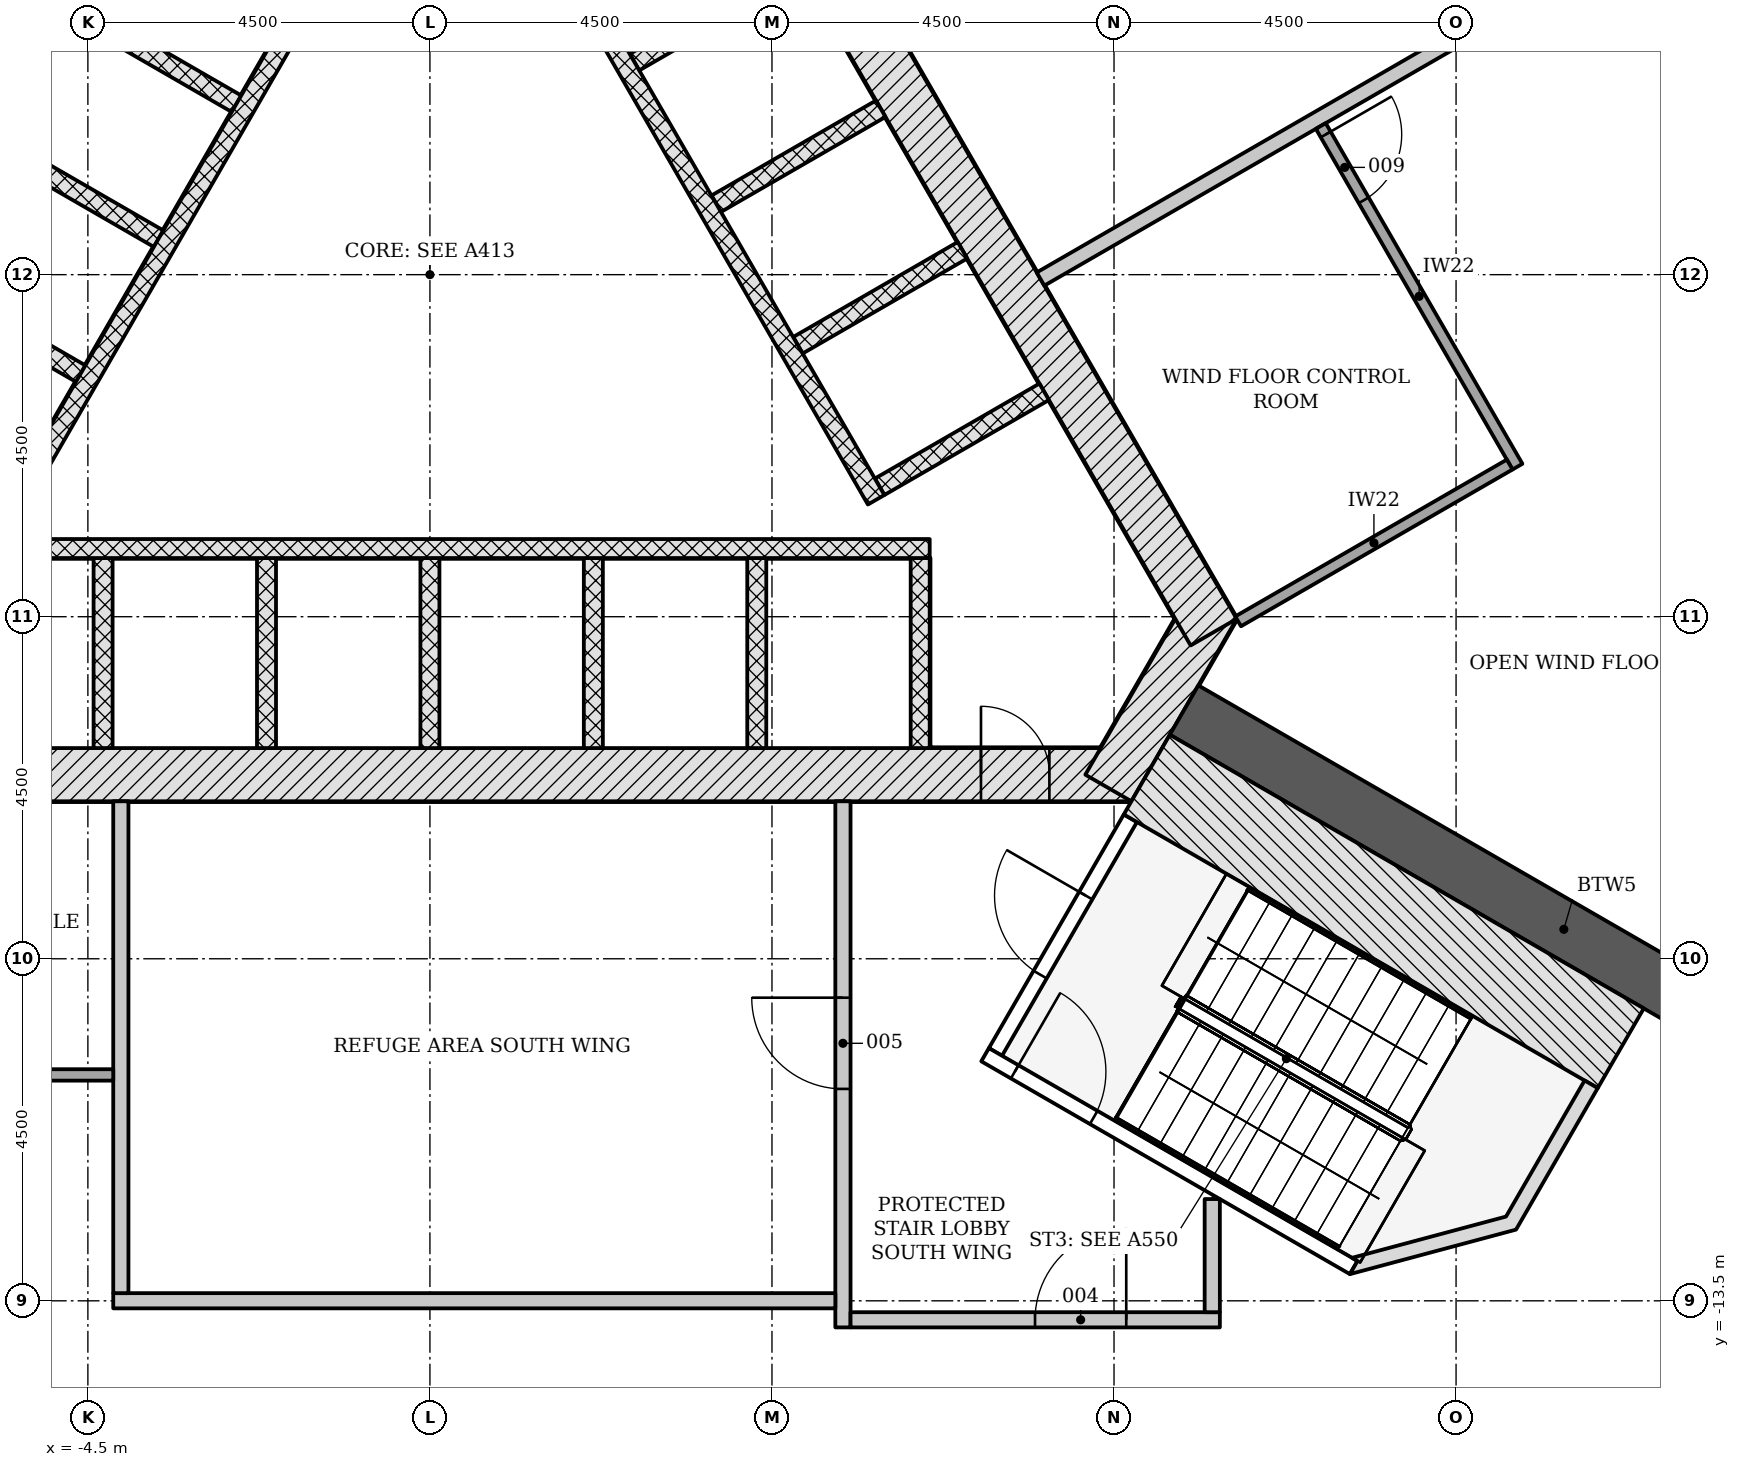
"""IFC4 building model, lengths in metres.
Left out: names, types, materials, properties, quantities, classifications, styles, units other than length and angle.
Written with IfcOpenShell. Run it as: python <this file> out.ifc"""

import sys

from ifc_helpers import new_model, si_unit, direction, frame, frame_2d, origin, place, context, subcontext, project, spatial, polyline, rectangle, outline, extrude, element, fill, save


model = new_model("IFC4")
c1 = context("Model", 3, precision=1e-05, world=origin(), true_north=direction((0.0, 1.0)))
c2 = subcontext(c1, "Body", "Model", "MODEL_VIEW")
j1 = project(units=[si_unit("LENGTHUNIT", "METRE"), si_unit("PLANEANGLEUNIT", "RADIAN")], contexts=[c1])
p1 = place(None, origin())
s1 = spatial("IfcSite", under=j1, at=p1, CompositionType="ELEMENT")
p2 = place(p1, origin())
s2 = spatial("IfcBuilding", under=s1, at=p2, CompositionType="ELEMENT")
p3 = place(p2, frame((0.0, 0.0, 127.5)))
s3 = spatial("IfcBuildingStorey", under=s2, at=p3, CompositionType="ELEMENT", Elevation=127.5)
p4 = place(p3, frame((-9.229, -6.578, -0.3), z_axis=(0.0, 0.0, 1.0), x_axis=(1.0, 0.0, 0.0)))
e1 = element("IfcWall", 1, at=p4, inside=s3, PredefinedType="SHEAR", context=c2, shape_type="SweptSolid", body=[
    extrude(rectangle(XDim=18.458, YDim=0.7, at=frame_2d((9.229, 0.0))), origin(), (0.0, 0.0, 1.0), 7.2),
])
p5 = place(p4, frame((1.0, 0.0, 0.3)))
e2 = element("IfcOpeningElement", 2, at=p5, cuts=e1, PredefinedType="OPENING", context=c2, shape_type="SweptSolid", body=[
    extrude(rectangle(XDim=1.0, YDim=2.1, at=frame_2d((0.5, 1.05))), frame((0.0, 0.36, 0.0), z_axis=(0.0, -1.0, 0.0), x_axis=(1.0, 0.0, 0.0)), (0.0, 0.0, 1.0), 0.72),
])
p6 = place(p4, frame((16.479, 0.0, 0.3)))
e3 = element("IfcOpeningElement", 3, at=p6, cuts=e1, PredefinedType="OPENING", context=c2, shape_type="SweptSolid", body=[
    extrude(rectangle(XDim=0.9, YDim=2.1, at=frame_2d((0.45, 1.05))), frame((0.0, 0.36, 0.0), z_axis=(0.0, -1.0, 0.0), x_axis=(1.0, 0.0, 0.0)), (0.0, 0.0, 1.0), 0.72),
])
p7 = place(p3, frame((8.926, -6.753, -0.3), z_axis=(0.0, 0.0, 1.0), x_axis=(0.500042739161, 0.866000726912, 0.0)))
e4 = element("IfcWall", 4, at=p7, inside=s3, PredefinedType="SHEAR", context=c2, shape_type="SweptSolid", body=[
    extrude(rectangle(XDim=2.771, YDim=0.7, at=frame_2d((1.386, 0.0))), origin(), (0.0, 0.0, 1.0), 7.2),
])
p8 = place(p3, frame((10.311, -4.703, -0.3), z_axis=(0.0, 0.0, 1.0), x_axis=(-0.500001446645, 0.866024568562, 0.0)))
e5 = element("IfcWall", 5, at=p8, inside=s3, PredefinedType="SHEAR", context=c2, shape_type="SweptSolid", body=[
    extrude(rectangle(XDim=18.458, YDim=0.7, at=frame_2d((9.229, 0.0))), origin(), (0.0, 0.0, 1.0), 7.2),
])
p9 = place(p3, frame((-1.083, 11.281, -0.3), z_axis=(0.0, 0.0, 1.0), x_axis=(-0.500001446645, -0.866024568562, 0.0)))
e6 = element("IfcWall", 6, at=p9, inside=s3, PredefinedType="SHEAR", context=c2, shape_type="SweptSolid", body=[
    extrude(rectangle(XDim=18.458, YDim=0.7, at=frame_2d((9.229, 0.0))), origin(), (0.0, 0.0, 1.0), 7.2),
])
p10 = place(p9, frame((8.979, 0.0, 0.3)))
e7 = element("IfcOpeningElement", 7, at=p10, cuts=e6, PredefinedType="OPENING", context=c2, shape_type="SweptSolid", body=[
    extrude(rectangle(XDim=1.2, YDim=2.1, at=frame_2d((0.6, 1.05))), frame((0.0, 0.36, 0.0), z_axis=(0.0, -1.0, 0.0), x_axis=(1.0, 0.0, 0.0)), (0.0, 0.0, 1.0), 0.72),
])
p11 = place(p9, frame((11.029, 0.0, 0.3)))
e8 = element("IfcOpeningElement", 8, at=p11, cuts=e6, PredefinedType="OPENING", context=c2, shape_type="SweptSolid", body=[
    extrude(rectangle(XDim=1.2, YDim=2.1, at=frame_2d((0.6, 1.05))), frame((0.0, 0.36, 0.0), z_axis=(0.0, -1.0, 0.0), x_axis=(1.0, 0.0, 0.0)), (0.0, 0.0, 1.0), 0.72),
])
p12 = place(p3, frame((9.922, -5.728, -0.3), z_axis=(0.0, 0.0, 1.0), x_axis=(0.866024913782, -0.500000848707, 0.0)))
e9 = element("IfcWall", 9, at=p12, inside=s3, PredefinedType="SHEAR", context=c2, shape_type="SweptSolid", body=[
    extrude(rectangle(XDim=11.539, YDim=0.75, at=frame_2d((5.769, 0.0))), origin(), (0.0, 0.0, 1.0), 7.2),
])
for number, where, z_axis, x_axis in (
    (10, (-4.3, -6.228, -0.3), (0.0, 0.0, 1.0), (0.0, 1.0, 0.0)),
    (11, (-2.15, -6.228, -0.3), (0.0, 0.0, 1.0), (0.0, 1.0, 0.0)),
    (12, (0.0, -6.228, -0.3), (0.0, 0.0, 1.0), (0.0, 1.0, 0.0)),
    (13, (2.15, -6.228, -0.3), (0.0, 0.0, 1.0), (0.0, 1.0, 0.0)),
    (14, (4.3, -6.228, -0.3), (0.0, 0.0, 1.0), (0.0, 1.0, 0.0)),
    (15, (6.45, -6.228, -0.3), (0.0, 0.0, 1.0), (0.0, 1.0, 0.0)),
):
    element("IfcWall", number, at=place(p3, frame(where, z_axis=z_axis, x_axis=x_axis)), inside=s3, PredefinedType="PARTITIONING", context=c2, shape_type="SweptSolid", body=[
        extrude(rectangle(XDim=2.5, YDim=0.25, at=frame_2d((1.25, 0.0))), origin(), (0.0, 0.0, 1.0), 7.2),
    ])
p13 = place(p3, frame((-6.575, -3.603, 0.0), z_axis=(0.0, 0.0, 1.0), x_axis=(1.0, 0.0, 0.0)))
e16 = element("IfcWall", 16, at=p13, inside=s3, PredefinedType="PARTITIONING", context=c2, shape_type="SweptSolid", body=[
    extrude(rectangle(XDim=13.15, YDim=0.25, at=frame_2d((6.575, 0.0))), origin(), (0.0, 0.0, 1.0), 6.9),
])
for number, where, z_axis, x_axis in (
    (17, (8.081, -1.541, 0.0), (0.0, 0.0, 1.0), (-0.866, -0.5, 0.0)),
    (18, (7.006, 0.321, 0.0), (0.0, 0.0, 1.0), (-0.866, -0.5, 0.0)),
):
    element("IfcWall", number, at=place(p3, frame(where, z_axis=z_axis, x_axis=x_axis)), inside=s3, PredefinedType="PARTITIONING", context=c2, shape_type="SweptSolid", body=[
        extrude(rectangle(XDim=2.5, YDim=0.25, at=frame_2d((1.25, 0.0))), origin(), (0.0, 0.0, 1.0), 6.9),
    ])
p14 = place(p3, frame((5.931, 2.183, 0.0), z_axis=(0.0, 0.0, 1.0), x_axis=(-0.866047370643, -0.499961950354, 0.0)))
e19 = element("IfcWall", 19, at=p14, inside=s3, PredefinedType="PARTITIONING", context=c2, shape_type="SweptSolid", body=[
    extrude(rectangle(XDim=2.5, YDim=0.25, at=frame_2d((1.25, 0.0))), origin(), (0.0, 0.0, 1.0), 6.9),
])
p15 = place(p3, frame((4.856, 4.045, 0.0), z_axis=(0.0, 0.0, 1.0), x_axis=(-0.866022959057, -0.500004234368, 0.0)))
e20 = element("IfcWall", 20, at=p15, inside=s3, PredefinedType="PARTITIONING", context=c2, shape_type="SweptSolid", body=[
    extrude(rectangle(XDim=2.5, YDim=0.25, at=frame_2d((1.25, 0.0))), origin(), (0.0, 0.0, 1.0), 6.9),
])
p16 = place(p3, frame((5.87, -2.961, 0.0), z_axis=(0.0, 0.0, 1.0), x_axis=(-0.50000615651, 0.866021849293, 0.0)))
e21 = element("IfcWall", 21, at=p16, inside=s3, PredefinedType="PARTITIONING", context=c2, shape_type="SweptSolid", body=[
    extrude(rectangle(XDim=11.0, YDim=0.25, at=frame_2d((5.5, 0.0))), origin(), (0.0, 0.0, 1.0), 6.9),
])
for number, where, z_axis, x_axis in (
    (22, (-5.056, 3.699, -0.3), (0.0, 0.0, 1.0), (0.866, -0.5, 0.0)),
    (23, (-6.081, 1.923, -0.3), (0.0, 0.0, 1.0), (0.866, -0.5, 0.0)),
    (24, (-7.106, 0.148, -0.3), (0.0, 0.0, 1.0), (0.866, -0.5, 0.0)),
):
    element("IfcWall", number, at=place(p3, frame(where, z_axis=z_axis, x_axis=x_axis)), inside=s3, PredefinedType="PARTITIONING", context=c2, shape_type="SweptSolid", body=[
        extrude(rectangle(XDim=2.9, YDim=0.25, at=frame_2d((1.45, 0.0))), origin(), (0.0, 0.0, 1.0), 7.2),
    ])
p17 = place(p3, frame((0.176, 6.711, 0.0), z_axis=(0.0, 0.0, 1.0), x_axis=(-0.500004227369, -0.866022963098, 0.0)))
e25 = element("IfcWall", 25, at=p17, inside=s3, PredefinedType="PARTITIONING", context=c2, shape_type="SweptSolid", body=[
    extrude(rectangle(XDim=11.8, YDim=0.25, at=frame_2d((5.9, 0.0))), origin(), (0.0, 0.0, 1.0), 6.9),
])
p18 = place(p3, frame((7.44, -10.226, -0.3), z_axis=(0.0, 0.0, 1.0), x_axis=(0.500022077904, 0.866012656725, 0.0)))
e26 = element("IfcWall", 26, at=p18, inside=s3, PredefinedType="SHEAR", context=c2, shape_type="SweptSolid", body=[
    extrude(rectangle(XDim=3.55, YDim=0.2, at=frame_2d((1.775, 0.0))), origin(), (0.0, 0.0, 1.0), 7.2),
])
p19 = place(p18, frame((1.175, 0.0, 0.3)))
e27 = element("IfcOpeningElement", 27, at=p19, cuts=e26, PredefinedType="OPENING", context=c2, shape_type="SweptSolid", body=[
    extrude(rectangle(XDim=1.2, YDim=2.1, at=frame_2d((0.6, 1.05))), frame((0.0, 0.11, 0.0), z_axis=(0.0, -1.0, 0.0), x_axis=(1.0, 0.0, 0.0)), (0.0, 0.0, 1.0), 0.22),
])
p20 = place(p3, frame((7.304, -10.262, -0.3), z_axis=(0.0, 0.0, 1.0), x_axis=(0.866026594901, -0.49999793692, 0.0)))
e28 = element("IfcWall", 28, at=p20, inside=s3, PredefinedType="SHEAR", context=c2, shape_type="SweptSolid", body=[
    extrude(rectangle(XDim=5.6, YDim=0.2, at=frame_2d((2.8, 0.0))), origin(), (0.0, 0.0, 1.0), 7.2),
])
p21 = place(p20, frame((0.45, 0.0, 0.3)))
e29 = element("IfcOpeningElement", 29, at=p21, cuts=e28, PredefinedType="OPENING", context=c2, shape_type="SweptSolid", body=[
    extrude(rectangle(XDim=1.2, YDim=2.1, at=frame_2d((0.6, 1.05))), frame((0.0, 0.11, 0.0), z_axis=(0.0, -1.0, 0.0), x_axis=(1.0, 0.0, 0.0)), (0.0, 0.0, 1.0), 0.22),
])
p22 = place(p3, frame((9.431, -6.577, -0.3), z_axis=(0.0, 0.0, 1.0), x_axis=(0.866018442252, -0.500012057535, 0.0)))
e30 = element("IfcWall", 30, at=p22, inside=s3, PredefinedType="SHEAR", context=c2, shape_type="SweptSolid", body=[
    extrude(rectangle(XDim=7.2, YDim=1.211, at=frame_2d((3.6, 0.0))), origin(), (0.0, 0.0, 1.0), 7.2),
])
p23 = place(p3, frame((0.0, 0.0, -0.3)))
e31 = element("IfcWall", 31, at=p23, inside=s3, PredefinedType="SHEAR", context=c2, shape_type="SweptSolid", body=[
    extrude(outline(polyline([(12.104, -13.149), (14.289, -12.563), (15.364, -10.701), (15.191, -10.601), (14.157, -12.392), (12.132, -12.934), (12.204, -12.976), (12.204, -12.976), (12.204, -12.976), (12.204, -12.976), (12.204, -12.976), (12.204, -12.976), (12.204, -12.976), (12.204, -12.976), (12.204, -12.976), (12.204, -12.976), (12.204, -12.976), (12.204, -12.976), (12.204, -12.976), (12.204, -12.976), (12.204, -12.976), (12.204, -12.976), (12.204, -12.976), (12.104, -13.149)])), origin(), (0.0, 0.0, 1.0), 7.2),
])
p24 = place(p3, frame((5.434, -13.85, 0.0), z_axis=(0.0, 0.0, 1.0), x_axis=(0.0, 1.0, 0.0)))
e32 = element("IfcWall", 32, at=p24, inside=s3, PredefinedType="PARTITIONING", context=c2, shape_type="SweptSolid", body=[
    extrude(rectangle(XDim=6.922, YDim=0.2, at=frame_2d((3.461, 0.0))), origin(), (0.0, 0.0, 1.0), 6.9),
])
p25 = place(p24, frame((3.138, 0.0, 0.0)))
e33 = element("IfcOpeningElement", 33, at=p25, cuts=e32, PredefinedType="OPENING", context=c2, shape_type="SweptSolid", body=[
    extrude(rectangle(XDim=1.2, YDim=2.1, at=frame_2d((0.6, 1.05))), frame((0.0, 0.11, 0.0), z_axis=(0.0, -1.0, 0.0), x_axis=(1.0, 0.0, 0.0)), (0.0, 0.0, 1.0), 0.22),
])
p26 = place(p3, frame((-4.167, -13.499, 0.0), z_axis=(0.0, 0.0, 1.0), x_axis=(1.0, 0.0, 0.0)))
e34 = element("IfcWall", 34, at=p26, inside=s3, PredefinedType="PARTITIONING", context=c2, shape_type="SweptSolid", body=[
    extrude(rectangle(XDim=9.5, YDim=0.2, at=frame_2d((4.75, 0.0))), origin(), (0.0, 0.0, 1.0), 6.347),
])
p27 = place(p3, frame((5.534, -13.75, 0.0), z_axis=(0.0, 0.0, 1.0), x_axis=(1.0, 0.0, 0.0)))
e35 = element("IfcWall", 35, at=p27, inside=s3, PredefinedType="PARTITIONING", context=c2, shape_type="SweptSolid", body=[
    extrude(rectangle(XDim=4.859, YDim=0.2, at=frame_2d((2.429, 0.0))), origin(), (0.0, 0.0, 1.0), 6.423),
])
p28 = place(p27, frame((2.427, 0.0, 0.0)))
e36 = element("IfcOpeningElement", 36, at=p28, cuts=e35, PredefinedType="OPENING", context=c2, shape_type="SweptSolid", body=[
    extrude(rectangle(XDim=1.2, YDim=2.1, at=frame_2d((0.6, 1.05))), frame((0.0, 0.11, 0.0), z_axis=(0.0, -1.0, 0.0), x_axis=(1.0, 0.0, 0.0)), (0.0, 0.0, 1.0), 0.22),
])
p29 = place(p3, frame((10.292, -13.65, 0.0), z_axis=(0.0, 0.0, 1.0), x_axis=(0.0, 1.0, 0.0)))
e37 = element("IfcWall", 37, at=p29, inside=s3, PredefinedType="PARTITIONING", context=c2, shape_type="SweptSolid", body=[
    extrude(rectangle(XDim=1.489, YDim=0.2, at=frame_2d((0.744, 0.0))), origin(), (0.0, 0.0, 1.0), 6.9),
])
p30 = place(p3, frame((-4.066, -13.399, 0.0), z_axis=(0.0, 0.0, 1.0), x_axis=(0.0, 1.0, 0.0)))
e38 = element("IfcWall", 38, at=p30, inside=s3, PredefinedType="PARTITIONING", context=c2, shape_type="SweptSolid", body=[
    extrude(rectangle(XDim=6.471, YDim=0.2, at=frame_2d((3.235, 0.0))), origin(), (0.0, 0.0, 1.0), 6.9),
])
p31 = place(p3, frame((-6.941, -10.528, 0.0), z_axis=(0.0, 0.0, 1.0), x_axis=(1.0, 0.0, 0.0)))
e39 = element("IfcWall", 39, at=p31, inside=s3, PredefinedType="PARTITIONING", context=c2, shape_type="SweptSolid", body=[
    extrude(rectangle(XDim=2.775, YDim=0.15, at=frame_2d((1.387, 0.0))), origin(), (0.0, 0.0, 1.0), 6.347),
])
p32 = place(p3, frame((8.033, -0.058, 0.0), z_axis=(0.0, 0.0, 1.0), x_axis=(0.866017203851, 0.500014202433, 0.0)))
e40 = element("IfcWall", 40, at=p32, inside=s3, PredefinedType="PARTITIONING", context=c2, shape_type="SweptSolid", body=[
    extrude(rectangle(XDim=6.471, YDim=0.2, at=frame_2d((3.235, 0.0))), origin(), (0.0, 0.0, 1.0), 6.9),
])
p33 = place(p3, frame((11.72, 1.956, 0.0), z_axis=(0.0, 0.0, 1.0), x_axis=(0.500020560727, -0.866013532718, 0.0)))
e41 = element("IfcWall", 41, at=p33, inside=s3, PredefinedType="PARTITIONING", context=c2, shape_type="SweptSolid", body=[
    extrude(rectangle(XDim=5.175, YDim=0.15, at=frame_2d((2.587, 0.0))), origin(), (0.0, 0.0, 1.0), 6.347),
])
p34 = place(p33, frame((0.129, 0.0, 0.0)))
e42 = element("IfcOpeningElement", 42, at=p34, cuts=e41, PredefinedType="OPENING", context=c2, shape_type="SweptSolid", body=[
    extrude(rectangle(XDim=1.0, YDim=2.1, at=frame_2d((0.5, 1.05))), frame((0.0, 0.085, 0.0), z_axis=(0.0, -1.0, 0.0), x_axis=(1.0, 0.0, 0.0)), (0.0, 0.0, 1.0), 0.17),
])
p35 = place(p3, frame((10.633, -4.561, 0.0), z_axis=(0.0, 0.0, 1.0), x_axis=(0.866019999656, 0.500009360108, 0.0)))
e43 = element("IfcWall", 43, at=p35, inside=s3, PredefinedType="PARTITIONING", context=c2, shape_type="SweptSolid", body=[
    extrude(rectangle(XDim=4.125, YDim=0.15, at=frame_2d((2.062, 0.0))), origin(), (0.0, 0.0, 1.0), 6.9),
])
p36 = place(p6, origin())
e44 = element("IfcDoor", 44, at=p36, inside=s3, OperationType="SINGLE_SWING_LEFT", PredefinedType="DOOR", context=c2, shape_type="SweptSolid", body=[
    extrude(rectangle(XDim=0.9, YDim=2.1, at=frame_2d((0.45, 1.05))), frame((0.0, 0.075, 0.0), z_axis=(0.0, -1.0, 0.0), x_axis=(1.0, 0.0, 0.0)), (0.0, 0.0, 1.0), 0.15),
])
fill(e3, e44)
p37 = place(p19, origin())
e45 = element("IfcDoor", 45, at=p37, inside=s3, OperationType="SINGLE_SWING_RIGHT", PredefinedType="DOOR", context=c2, shape_type="SweptSolid", body=[
    extrude(rectangle(XDim=1.2, YDim=2.1, at=frame_2d((0.6, 1.05))), frame((0.0, 0.025, 0.0), z_axis=(0.0, -1.0, 0.0), x_axis=(1.0, 0.0, 0.0)), (0.0, 0.0, 1.0), 0.05),
])
fill(e27, e45)
p38 = place(p21, origin())
e46 = element("IfcDoor", 46, at=p38, inside=s3, OperationType="SINGLE_SWING_LEFT", PredefinedType="DOOR", context=c2, shape_type="SweptSolid", body=[
    extrude(rectangle(XDim=1.2, YDim=2.1, at=frame_2d((0.6, 1.05))), frame((0.0, 0.025, 0.0), z_axis=(0.0, -1.0, 0.0), x_axis=(1.0, 0.0, 0.0)), (0.0, 0.0, 1.0), 0.05),
])
fill(e29, e46)
p39 = place(p28, origin())
e47 = element("IfcDoor", 47, at=p39, inside=s3, OperationType="SINGLE_SWING_RIGHT", PredefinedType="DOOR", context=c2, shape_type="SweptSolid", body=[
    extrude(rectangle(XDim=1.2, YDim=2.1, at=frame_2d((0.6, 1.05))), frame((0.0, 0.025, 0.0), z_axis=(0.0, -1.0, 0.0), x_axis=(1.0, 0.0, 0.0)), (0.0, 0.0, 1.0), 0.05),
])
fill(e36, e47)
p40 = place(p25, origin())
e48 = element("IfcDoor", 48, at=p40, inside=s3, OperationType="SINGLE_SWING_RIGHT", PredefinedType="DOOR", context=c2, shape_type="SweptSolid", body=[
    extrude(rectangle(XDim=1.2, YDim=2.1, at=frame_2d((0.6, 1.05))), frame((0.0, 0.025, 0.0), z_axis=(0.0, -1.0, 0.0), x_axis=(1.0, 0.0, 0.0)), (0.0, 0.0, 1.0), 0.05),
])
fill(e33, e48)
p41 = place(p34, origin())
e49 = element("IfcDoor", 49, at=p41, inside=s3, OperationType="SINGLE_SWING_LEFT", PredefinedType="DOOR", context=c2, shape_type="SweptSolid", body=[
    extrude(rectangle(XDim=1.0, YDim=2.1, at=frame_2d((0.5, 1.05))), frame((0.0, 0.025, 0.0), z_axis=(0.0, -1.0, 0.0), x_axis=(1.0, 0.0, 0.0)), (0.0, 0.0, 1.0), 0.05),
])
fill(e42, e49)
save(model, sys.argv[1])
